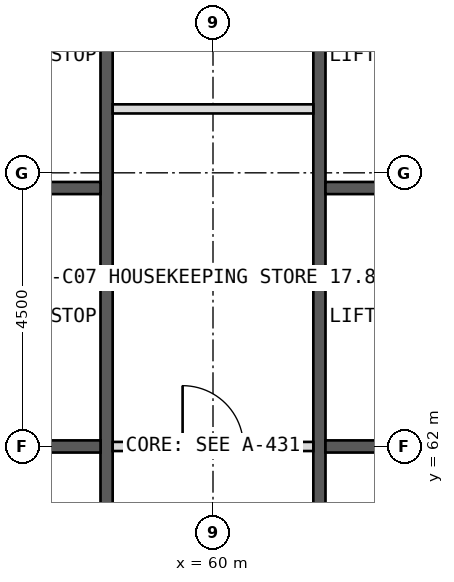
"""IFC4 building model, lengths in metres.
Left out: names, types, materials, properties, quantities, classifications, styles, units other than length and angle.
Written with IfcOpenShell. Run it as: python <this file> out.ifc"""

import sys

from ifc_helpers import new_model, si_unit, direction, frame, frame_2d, origin, place, context, subcontext, project, spatial, rectangle, extrude, element, fill, save


model = new_model("IFC4")
c1 = context("Model", 3, precision=1e-05, world=origin(), true_north=direction((0.0, 1.0)))
c2 = subcontext(c1, "Body", "Model", "MODEL_VIEW")
j1 = project(units=[si_unit("LENGTHUNIT", "METRE"), si_unit("PLANEANGLEUNIT", "RADIAN")], contexts=[c1])
p1 = place(None, origin())
s1 = spatial("IfcSite", under=j1, at=p1, CompositionType="ELEMENT")
p2 = place(p1, origin())
s2 = spatial("IfcBuilding", under=s1, at=p2, CompositionType="ELEMENT")
p3 = place(p2, frame((0.0, 0.0, 128.0)))
s3 = spatial("IfcBuildingStorey", under=s2, at=p3, CompositionType="ELEMENT", Elevation=128.0)
p4 = place(p3, frame((58.25, 53.5, 0.0), z_axis=(0.0, 0.0, 1.0), x_axis=(0.0, 1.0, 0.0)))
e1 = element("IfcWall", 1, at=p4, inside=s3, PredefinedType="SHEAR", context=c2, shape_type="SweptSolid", body=[
    extrude(rectangle(XDim=17.0, YDim=0.2, at=frame_2d((8.5, 0.0))), origin(), (0.0, 0.0, 1.0), 4.0),
])
p5 = place(p4, frame((1.375, 0.0, 0.0)))
e2 = element("IfcOpeningElement", 2, at=p5, cuts=e1, PredefinedType="OPENING", context=c2, shape_type="SweptSolid", body=[
    extrude(rectangle(XDim=1.4, YDim=2.2, at=frame_2d((0.7, 1.1))), frame((0.0, 0.11, 0.0), z_axis=(0.0, -1.0, 0.0), x_axis=(1.0, 0.0, 0.0)), (0.0, 0.0, 1.0), 0.22),
])
p6 = place(p4, frame((5.675, 0.0, 0.0)))
e3 = element("IfcOpeningElement", 3, at=p6, cuts=e1, PredefinedType="OPENING", context=c2, shape_type="SweptSolid", body=[
    extrude(rectangle(XDim=1.4, YDim=2.2, at=frame_2d((0.7, 1.1))), frame((0.0, 0.11, 0.0), z_axis=(0.0, -1.0, 0.0), x_axis=(1.0, 0.0, 0.0)), (0.0, 0.0, 1.0), 0.22),
])
p7 = place(p3, frame((61.75, 53.5, 0.0), z_axis=(0.0, 0.0, 1.0), x_axis=(0.0, 1.0, 0.0)))
e4 = element("IfcWall", 4, at=p7, inside=s3, PredefinedType="SHEAR", context=c2, shape_type="SweptSolid", body=[
    extrude(rectangle(XDim=17.0, YDim=0.2, at=frame_2d((8.5, 0.0))), origin(), (0.0, 0.0, 1.0), 4.0),
])
p8 = place(p7, frame((1.375, 0.0, 0.0)))
e5 = element("IfcOpeningElement", 5, at=p8, cuts=e4, PredefinedType="OPENING", context=c2, shape_type="SweptSolid", body=[
    extrude(rectangle(XDim=1.4, YDim=2.2, at=frame_2d((0.7, 1.1))), frame((0.0, 0.11, 0.0), z_axis=(0.0, -1.0, 0.0), x_axis=(1.0, 0.0, 0.0)), (0.0, 0.0, 1.0), 0.22),
])
p9 = place(p7, frame((5.675, 0.0, 0.0)))
e6 = element("IfcOpeningElement", 6, at=p9, cuts=e4, PredefinedType="OPENING", context=c2, shape_type="SweptSolid", body=[
    extrude(rectangle(XDim=1.4, YDim=2.2, at=frame_2d((0.7, 1.1))), frame((0.0, 0.11, 0.0), z_axis=(0.0, -1.0, 0.0), x_axis=(1.0, 0.0, 0.0)), (0.0, 0.0, 1.0), 0.22),
])
for number, where, z_axis, x_axis in (
    (7, (55.1, 62.0, 0.0), (0.0, 0.0, 1.0), (1.0, 0.0, 0.0)),
    (8, (61.85, 62.0, 0.0), (0.0, 0.0, 1.0), (1.0, 0.0, 0.0)),
    (9, (55.1, 66.25, 0.0), (0.0, 0.0, 1.0), (1.0, 0.0, 0.0)),
    (10, (61.85, 66.25, 0.0), (0.0, 0.0, 1.0), (1.0, 0.0, 0.0)),
):
    element("IfcWall", number, at=place(p3, frame(where, z_axis=z_axis, x_axis=x_axis)), inside=s3, PredefinedType="SHEAR", context=c2, shape_type="SweptSolid", body=[
        extrude(rectangle(XDim=3.05, YDim=0.2, at=frame_2d((1.525, 0.0))), origin(), (0.0, 0.0, 1.0), 4.0),
    ])
p10 = place(p3, frame((58.35, 62.0, 0.0), z_axis=(0.0, 0.0, 1.0), x_axis=(1.0, 0.0, 0.0)))
e11 = element("IfcWall", 11, at=p10, inside=s3, PredefinedType="PARTITIONING", context=c2, shape_type="SweptSolid", body=[
    extrude(rectangle(XDim=3.3, YDim=0.15, at=frame_2d((1.65, 0.0))), origin(), (0.0, 0.0, 1.0), 3.75),
])
p11 = place(p10, frame((1.15, 0.0, 0.0)))
e12 = element("IfcOpeningElement", 12, at=p11, cuts=e11, PredefinedType="OPENING", context=c2, shape_type="SweptSolid", body=[
    extrude(rectangle(XDim=1.0, YDim=2.1, at=frame_2d((0.5, 1.05))), frame((0.0, 0.085, 0.0), z_axis=(0.0, -1.0, 0.0), x_axis=(1.0, 0.0, 0.0)), (0.0, 0.0, 1.0), 0.17),
])
p12 = place(p3, frame((58.35, 67.551, 0.0), z_axis=(0.0, 0.0, 1.0), x_axis=(1.0, 0.0, 0.0)))
e13 = element("IfcWall", 13, at=p12, inside=s3, PredefinedType="PARTITIONING", context=c2, shape_type="SweptSolid", body=[
    extrude(rectangle(XDim=3.3, YDim=0.15, at=frame_2d((1.65, 0.0))), origin(), (0.0, 0.0, 1.0), 3.75),
])
p13 = place(p11, origin())
e14 = element("IfcDoor", 14, at=p13, inside=s3, OperationType="SINGLE_SWING_LEFT", PredefinedType="DOOR", context=c2, shape_type="SweptSolid", body=[
    extrude(rectangle(XDim=1.0, YDim=2.1, at=frame_2d((0.5, 1.05))), frame((0.0, 0.025, 0.0), z_axis=(0.0, -1.0, 0.0), x_axis=(1.0, 0.0, 0.0)), (0.0, 0.0, 1.0), 0.05),
])
fill(e12, e14)
save(model, sys.argv[1])
